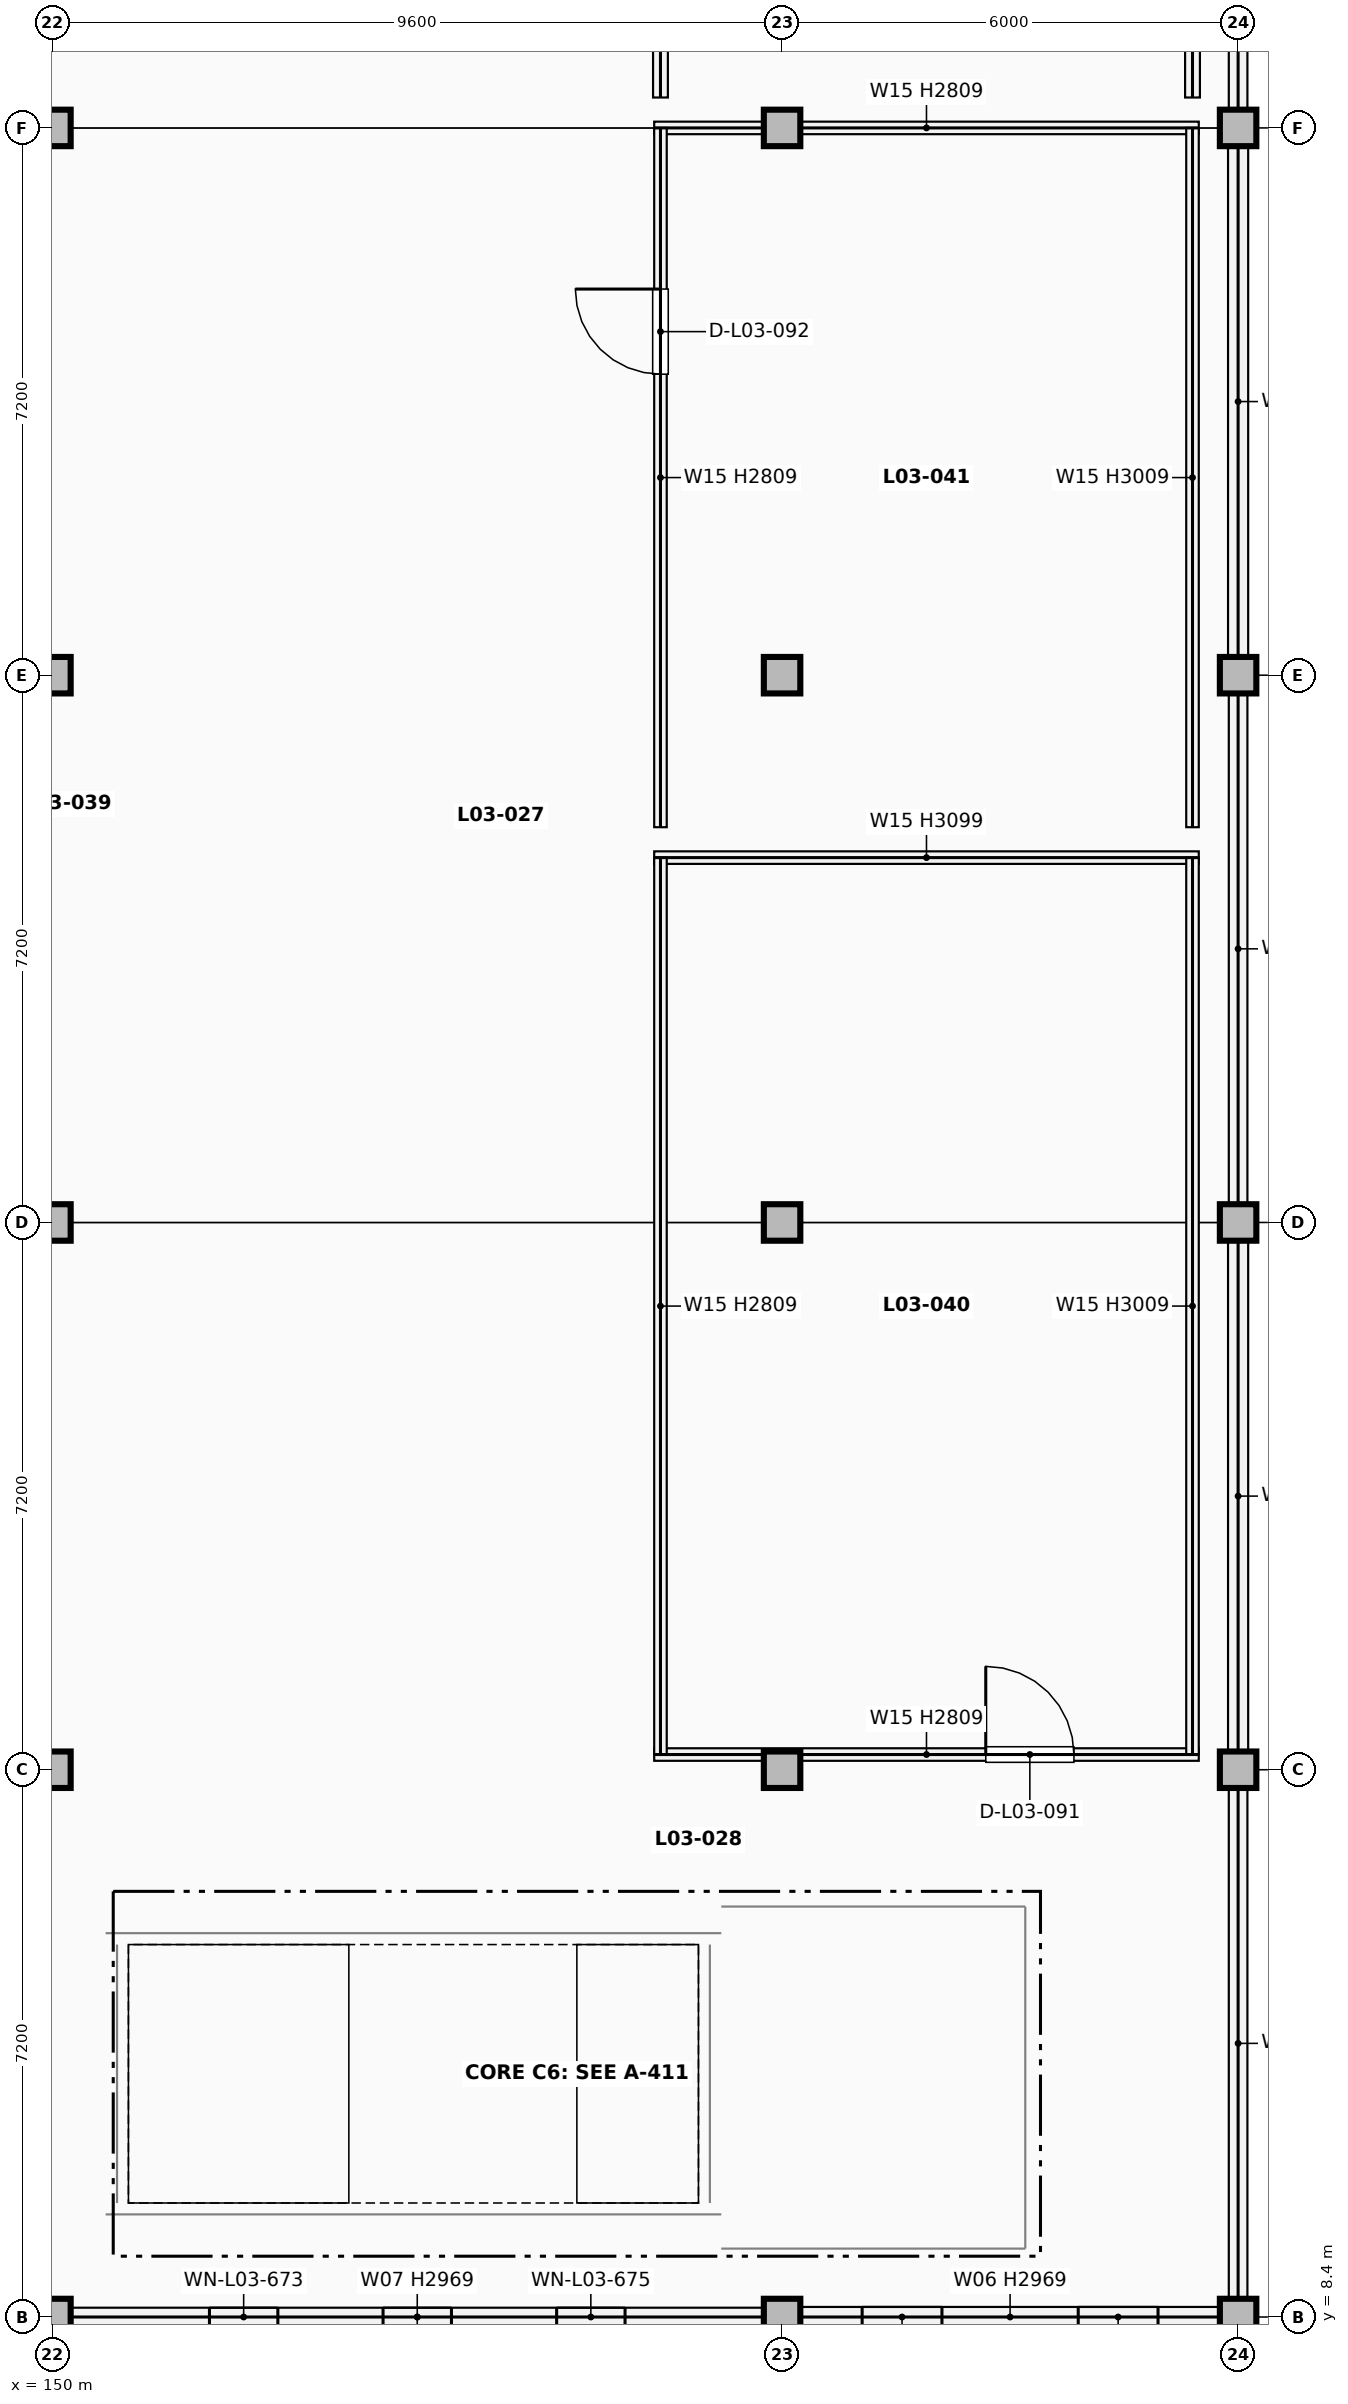
"""IFC4 building model, lengths in metres.
Left out: names, types, materials, properties, quantities, classifications, styles, units other than length and angle.
Written with IfcOpenShell. Run it as: python <this file> out.ifc"""

import sys

from ifc_helpers import new_model, si_unit, direction, frame, frame_2d, origin, origin_2d, place, context, subcontext, project, spatial, rectangle, extrude, element, fill, save


model = new_model("IFC4")
c1 = context("Model", 3, precision=1e-05, world=origin(), true_north=direction((0.0, 1.0)))
c2 = subcontext(c1, "Body", "Model", "MODEL_VIEW")
j1 = project(units=[si_unit("LENGTHUNIT", "METRE"), si_unit("PLANEANGLEUNIT", "RADIAN")], contexts=[c1])
p1 = place(None, origin())
s1 = spatial("IfcSite", under=j1, at=p1, CompositionType="ELEMENT")
p2 = place(p1, origin())
s2 = spatial("IfcBuilding", under=s1, at=p2, CompositionType="ELEMENT")
p3 = place(p2, frame((0.0, 0.0, 13.6)))
s3 = spatial("IfcBuildingStorey", under=s2, at=p3, CompositionType="ELEMENT", Elevation=13.6)
for number, where, z_axis, x_axis in (
    (1, (150.0, 8.4, 0.0), (0.0, 0.0, 1.0), (1.0, 0.0, 0.0)),
    (2, (150.0, 15.6, 0.0), (0.0, 0.0, 1.0), (1.0, 0.0, 0.0)),
    (3, (150.0, 22.8, 0.0), (0.0, 0.0, 1.0), (1.0, 0.0, 0.0)),
    (4, (150.0, 30.0, 0.0), (0.0, 0.0, 1.0), (1.0, 0.0, 0.0)),
    (5, (150.0, 37.2, 0.0), (0.0, 0.0, 1.0), (1.0, 0.0, 0.0)),
    (6, (159.6, 8.4, 0.0), (0.0, 0.0, 1.0), (1.0, 0.0, 0.0)),
    (7, (159.6, 15.6, 0.0), (0.0, 0.0, 1.0), (1.0, 0.0, 0.0)),
    (8, (159.6, 22.8, 0.0), (0.0, 0.0, 1.0), (1.0, 0.0, 0.0)),
    (9, (159.6, 30.0, 0.0), (0.0, 0.0, 1.0), (1.0, 0.0, 0.0)),
    (10, (159.6, 37.2, 0.0), (0.0, 0.0, 1.0), (1.0, 0.0, 0.0)),
    (11, (165.6, 8.4, 0.0), (0.0, 0.0, 1.0), (1.0, 0.0, 0.0)),
    (12, (165.6, 15.6, 0.0), (0.0, 0.0, 1.0), (1.0, 0.0, 0.0)),
    (13, (165.6, 22.8, 0.0), (0.0, 0.0, 1.0), (1.0, 0.0, 0.0)),
    (14, (165.6, 30.0, 0.0), (0.0, 0.0, 1.0), (1.0, 0.0, 0.0)),
    (15, (165.6, 37.2, 0.0), (0.0, 0.0, 1.0), (1.0, 0.0, 0.0)),
):
    element("IfcColumn", number, at=place(p3, frame(where, z_axis=z_axis, x_axis=x_axis)), inside=s3, PredefinedType="COLUMN", context=c2, shape_type="SweptSolid", body=[
        extrude(rectangle(XDim=0.48, YDim=0.48, at=origin_2d()), origin(), (0.0, 0.0, 1.0), 3.74),
    ])
p4 = place(p3, frame((165.6, 8.642, 0.0), z_axis=(0.0, 0.0, 1.0), x_axis=(0.0, 1.0, 0.0)))
e16 = element("IfcWall", 16, at=p4, inside=s3, PredefinedType="SOLIDWALL", context=c2, shape_type="SweptSolid", body=[
    extrude(rectangle(XDim=6.716, YDim=0.245, at=frame_2d((3.358, 0.0))), origin(), (0.0, 0.0, 1.0), 2.969),
])
p5 = place(p3, frame((165.6, 15.842, 0.0), z_axis=(0.0, 0.0, 1.0), x_axis=(0.0, 1.0, 0.0)))
e17 = element("IfcWall", 17, at=p5, inside=s3, PredefinedType="SOLIDWALL", context=c2, shape_type="SweptSolid", body=[
    extrude(rectangle(XDim=6.716, YDim=0.265, at=frame_2d((3.358, 0.0))), origin(), (0.0, 0.0, 1.0), 2.999),
])
p6 = place(p3, frame((165.6, 23.042, 0.0), z_axis=(0.0, 0.0, 1.0), x_axis=(0.0, 1.0, 0.0)))
e18 = element("IfcWall", 18, at=p6, inside=s3, PredefinedType="SOLIDWALL", context=c2, shape_type="SweptSolid", body=[
    extrude(rectangle(XDim=6.716, YDim=0.245, at=frame_2d((3.358, 0.0))), origin(), (0.0, 0.0, 1.0), 2.999),
])
p7 = place(p3, frame((165.6, 30.242, 0.0), z_axis=(0.0, 0.0, 1.0), x_axis=(0.0, 1.0, 0.0)))
e19 = element("IfcWall", 19, at=p7, inside=s3, PredefinedType="SOLIDWALL", context=c2, shape_type="SweptSolid", body=[
    extrude(rectangle(XDim=6.716, YDim=0.265, at=frame_2d((3.358, 0.0))), origin(), (0.0, 0.0, 1.0), 2.999),
])
p8 = place(p3, frame((165.6, 37.442, 0.0), z_axis=(0.0, 0.0, 1.0), x_axis=(0.0, 1.0, 0.0)))
e20 = element("IfcWall", 20, at=p8, inside=s3, PredefinedType="SOLIDWALL", context=c2, shape_type="SweptSolid", body=[
    extrude(rectangle(XDim=6.716, YDim=0.245, at=frame_2d((3.358, 0.0))), origin(), (0.0, 0.0, 1.0), 2.999),
])
p9 = place(p3, frame((150.242, 8.4, 0.0), z_axis=(0.0, 0.0, 1.0), x_axis=(1.0, 0.0, 0.0)))
e21 = element("IfcWall", 21, at=p9, inside=s3, PredefinedType="SOLIDWALL", context=c2, shape_type="SweptSolid", body=[
    extrude(rectangle(XDim=9.116, YDim=0.245, at=frame_2d((4.558, 0.0))), origin(), (0.0, 0.0, 1.0), 2.969),
])
p10 = place(p9, frame((1.824, 0.0, 0.75)))
e22 = element("IfcOpeningElement", 22, at=p10, cuts=e21, PredefinedType="OPENING", context=c2, shape_type="SweptSolid", body=[
    extrude(rectangle(XDim=0.9, YDim=1.95, at=frame_2d((0.45, 0.975))), frame((0.0, 0.133, 0.0), z_axis=(0.0, -1.0, 0.0), x_axis=(1.0, 0.0, 0.0)), (0.0, 0.0, 1.0), 0.265),
])
p11 = place(p9, frame((4.108, 0.0, 0.75)))
e23 = element("IfcOpeningElement", 23, at=p11, cuts=e21, PredefinedType="OPENING", context=c2, shape_type="SweptSolid", body=[
    extrude(rectangle(XDim=0.9, YDim=1.95, at=frame_2d((0.45, 0.975))), frame((0.0, 0.133, 0.0), z_axis=(0.0, -1.0, 0.0), x_axis=(1.0, 0.0, 0.0)), (0.0, 0.0, 1.0), 0.265),
])
p12 = place(p9, frame((6.392, 0.0, 0.75)))
e24 = element("IfcOpeningElement", 24, at=p12, cuts=e21, PredefinedType="OPENING", context=c2, shape_type="SweptSolid", body=[
    extrude(rectangle(XDim=0.9, YDim=1.95, at=frame_2d((0.45, 0.975))), frame((0.0, 0.133, 0.0), z_axis=(0.0, -1.0, 0.0), x_axis=(1.0, 0.0, 0.0)), (0.0, 0.0, 1.0), 0.265),
])
p13 = place(p3, frame((159.842, 8.4, 0.0), z_axis=(0.0, 0.0, 1.0), x_axis=(1.0, 0.0, 0.0)))
e25 = element("IfcWall", 25, at=p13, inside=s3, PredefinedType="SOLIDWALL", context=c2, shape_type="SweptSolid", body=[
    extrude(rectangle(XDim=5.516, YDim=0.265, at=frame_2d((2.758, 0.0))), origin(), (0.0, 0.0, 1.0), 2.969),
])
p14 = place(p13, frame((0.812, 0.0, 0.75)))
e26 = element("IfcOpeningElement", 26, at=p14, cuts=e25, PredefinedType="OPENING", context=c2, shape_type="SweptSolid", body=[
    extrude(rectangle(XDim=1.05, YDim=2.1, at=frame_2d((0.525, 1.05))), frame((0.0, 0.143, 0.0), z_axis=(0.0, -1.0, 0.0), x_axis=(1.0, 0.0, 0.0)), (0.0, 0.0, 1.0), 0.285),
])
p15 = place(p13, frame((3.655, 0.0, 0.75)))
e27 = element("IfcOpeningElement", 27, at=p15, cuts=e25, PredefinedType="OPENING", context=c2, shape_type="SweptSolid", body=[
    extrude(rectangle(XDim=1.05, YDim=2.1, at=frame_2d((0.525, 1.05))), frame((0.0, 0.143, 0.0), z_axis=(0.0, -1.0, 0.0), x_axis=(1.0, 0.0, 0.0)), (0.0, 0.0, 1.0), 0.285),
])
p16 = place(p3, frame((150.85, 9.9, 0.0), z_axis=(0.0, 0.0, 1.0), x_axis=(0.0, 1.0, 0.0)))
e28 = element("IfcWall", 28, at=p16, inside=s3, PredefinedType="SHEAR", context=c2, shape_type="SweptSolid", body=[
    extrude(rectangle(XDim=3.4, YDim=0.3, at=frame_2d((1.7, 0.0))), origin(), (0.0, 0.0, 1.0), 3.74),
])
for number, where, z_axis, x_axis in (
    (29, (150.7, 9.75, 0.0), (0.0, 0.0, 1.0), (1.0, 0.0, 0.0)),
    (30, (150.7, 13.45, 0.0), (0.0, 0.0, 1.0), (1.0, 0.0, 0.0)),
):
    element("IfcWall", number, at=place(p3, frame(where, z_axis=z_axis, x_axis=x_axis)), inside=s3, PredefinedType="SHEAR", context=c2, shape_type="SweptSolid", body=[
        extrude(rectangle(XDim=8.1, YDim=0.3, at=frame_2d((4.05, 0.0))), origin(), (0.0, 0.0, 1.0), 3.74),
    ])
p17 = place(p3, frame((158.65, 9.9, 0.0), z_axis=(0.0, 0.0, 1.0), x_axis=(0.0, 1.0, 0.0)))
e31 = element("IfcWall", 31, at=p17, inside=s3, PredefinedType="SHEAR", context=c2, shape_type="SweptSolid", body=[
    extrude(rectangle(XDim=3.4, YDim=0.3, at=frame_2d((1.7, 0.0))), origin(), (0.0, 0.0, 1.0), 3.74),
])
p18 = place(p17, frame((1.1, 0.0, 0.0)))
e32 = element("IfcOpeningElement", 32, at=p18, cuts=e31, PredefinedType="OPENING", context=c2, shape_type="SweptSolid", body=[
    extrude(rectangle(XDim=1.2, YDim=2.2, at=frame_2d((0.6, 1.1))), frame((0.0, 0.16, 0.0), z_axis=(0.0, -1.0, 0.0), x_axis=(1.0, 0.0, 0.0)), (0.0, 0.0, 1.0), 0.32),
])
p19 = place(p3, frame((162.8, 9.3, 0.0), z_axis=(0.0, 0.0, 1.0), x_axis=(0.0, 1.0, 0.0)))
e33 = element("IfcWall", 33, at=p19, inside=s3, PredefinedType="PARTITIONING", context=c2, shape_type="SweptSolid", body=[
    extrude(rectangle(XDim=4.5, YDim=0.2, at=frame_2d((2.25, 0.0))), origin(), (0.0, 0.0, 1.0), 3.099),
])
p20 = place(p3, frame((158.8, 9.3, 0.0), z_axis=(0.0, 0.0, 1.0), x_axis=(1.0, 0.0, 0.0)))
e34 = element("IfcWall", 34, at=p20, inside=s3, PredefinedType="PARTITIONING", context=c2, shape_type="SweptSolid", body=[
    extrude(rectangle(XDim=4.0, YDim=0.2, at=frame_2d((2.0, 0.0))), origin(), (0.0, 0.0, 1.0), 3.099),
])
p21 = place(p3, frame((158.8, 13.8, 0.0), z_axis=(0.0, 0.0, 1.0), x_axis=(1.0, 0.0, 0.0)))
e35 = element("IfcWall", 35, at=p21, inside=s3, PredefinedType="PARTITIONING", context=c2, shape_type="SweptSolid", body=[
    extrude(rectangle(XDim=4.0, YDim=0.2, at=frame_2d((2.0, 0.0))), origin(), (0.0, 0.0, 1.0), 3.099),
])
p22 = place(p21, frame((1.275, 0.0, 0.0)))
e36 = element("IfcOpeningElement", 36, at=p22, cuts=e35, PredefinedType="OPENING", context=c2, shape_type="SweptSolid", body=[
    extrude(rectangle(XDim=1.45, YDim=2.2, at=frame_2d((0.725, 1.1))), frame((0.0, 0.11, 0.0), z_axis=(0.0, -1.0, 0.0), x_axis=(1.0, 0.0, 0.0)), (0.0, 0.0, 1.0), 0.22),
])
p23 = place(p3, frame((157.917, 15.8, 0.0), z_axis=(0.0, 0.0, 1.0), x_axis=(1.0, 0.0, 0.0)))
e37 = element("IfcWall", 37, at=p23, inside=s3, PredefinedType="PARTITIONING", context=c2, shape_type="SweptSolid", body=[
    extrude(rectangle(XDim=7.165, YDim=0.165, at=frame_2d((3.583, 0.0))), origin(), (0.0, 0.0, 1.0), 2.809),
])
p24 = place(p23, frame((4.363, 0.0, 0.0)))
e38 = element("IfcOpeningElement", 38, at=p24, cuts=e37, PredefinedType="OPENING", context=c2, shape_type="SweptSolid", body=[
    extrude(rectangle(XDim=1.16, YDim=2.22, at=frame_2d((0.58, 1.11))), frame((0.0, 0.093, 0.0), z_axis=(0.0, -1.0, 0.0), x_axis=(1.0, 0.0, 0.0)), (0.0, 0.0, 1.0), 0.185),
])
p25 = place(p3, frame((157.917, 27.6, 0.0), z_axis=(0.0, 0.0, 1.0), x_axis=(1.0, 0.0, 0.0)))
e39 = element("IfcWall", 39, at=p25, inside=s3, PredefinedType="PARTITIONING", context=c2, shape_type="SweptSolid", body=[
    extrude(rectangle(XDim=7.165, YDim=0.165, at=frame_2d((3.583, 0.0))), origin(), (0.0, 0.0, 1.0), 3.099),
])
p26 = place(p3, frame((158.0, 15.8, 0.0), z_axis=(0.0, 0.0, 1.0), x_axis=(0.0, 1.0, 0.0)))
e40 = element("IfcWall", 40, at=p26, inside=s3, PredefinedType="PARTITIONING", context=c2, shape_type="SweptSolid", body=[
    extrude(rectangle(XDim=11.8, YDim=0.165, at=frame_2d((5.9, 0.0))), origin(), (0.0, 0.0, 1.0), 2.809),
])
p27 = place(p3, frame((165.0, 15.8, 0.0), z_axis=(0.0, 0.0, 1.0), x_axis=(0.0, 1.0, 0.0)))
e41 = element("IfcWall", 41, at=p27, inside=s3, PredefinedType="PARTITIONING", context=c2, shape_type="SweptSolid", body=[
    extrude(rectangle(XDim=11.8, YDim=0.165, at=frame_2d((5.9, 0.0))), origin(), (0.0, 0.0, 1.0), 3.009),
])
p28 = place(p3, frame((157.917, 37.2, 0.0), z_axis=(0.0, 0.0, 1.0), x_axis=(1.0, 0.0, 0.0)))
e42 = element("IfcWall", 42, at=p28, inside=s3, PredefinedType="PARTITIONING", context=c2, shape_type="SweptSolid", body=[
    extrude(rectangle(XDim=7.165, YDim=0.165, at=frame_2d((3.583, 0.0))), origin(), (0.0, 0.0, 1.0), 2.809),
])
p29 = place(p3, frame((158.0, 28.0, 0.0), z_axis=(0.0, 0.0, 1.0), x_axis=(0.0, 1.0, 0.0)))
e43 = element("IfcWall", 43, at=p29, inside=s3, PredefinedType="PARTITIONING", context=c2, shape_type="SweptSolid", body=[
    extrude(rectangle(XDim=9.2, YDim=0.165, at=frame_2d((4.6, 0.0))), origin(), (0.0, 0.0, 1.0), 2.809),
])
p30 = place(p29, frame((5.96, 0.0, 0.0)))
e44 = element("IfcOpeningElement", 44, at=p30, cuts=e43, PredefinedType="OPENING", context=c2, shape_type="SweptSolid", body=[
    extrude(rectangle(XDim=1.12, YDim=2.22, at=frame_2d((0.56, 1.11))), frame((0.0, 0.093, 0.0), z_axis=(0.0, -1.0, 0.0), x_axis=(1.0, 0.0, 0.0)), (0.0, 0.0, 1.0), 0.185),
])
p31 = place(p3, frame((165.0, 28.0, 0.0), z_axis=(0.0, 0.0, 1.0), x_axis=(0.0, 1.0, 0.0)))
e45 = element("IfcWall", 45, at=p31, inside=s3, PredefinedType="PARTITIONING", context=c2, shape_type="SweptSolid", body=[
    extrude(rectangle(XDim=9.2, YDim=0.165, at=frame_2d((4.6, 0.0))), origin(), (0.0, 0.0, 1.0), 3.009),
])
p32 = place(p3, frame((158.0, 37.6, 0.0), z_axis=(0.0, 0.0, 1.0), x_axis=(0.0, 1.0, 0.0)))
e46 = element("IfcWall", 46, at=p32, inside=s3, PredefinedType="PARTITIONING", context=c2, shape_type="SweptSolid", body=[
    extrude(rectangle(XDim=6.4, YDim=0.195, at=frame_2d((3.2, 0.0))), origin(), (0.0, 0.0, 1.0), 3.414),
])
p33 = place(p32, frame((2.675, 0.0, 0.0)))
e47 = element("IfcOpeningElement", 47, at=p33, cuts=e46, PredefinedType="OPENING", context=c2, shape_type="SweptSolid", body=[
    extrude(rectangle(XDim=1.05, YDim=2.15, at=frame_2d((0.525, 1.075))), frame((0.0, 0.107, 0.0), z_axis=(0.0, -1.0, 0.0), x_axis=(1.0, 0.0, 0.0)), (0.0, 0.0, 1.0), 0.215),
])
p34 = place(p3, frame((165.0, 37.6, 0.0), z_axis=(0.0, 0.0, 1.0), x_axis=(0.0, 1.0, 0.0)))
e48 = element("IfcWall", 48, at=p34, inside=s3, PredefinedType="PARTITIONING", context=c2, shape_type="SweptSolid", body=[
    extrude(rectangle(XDim=6.4, YDim=0.195, at=frame_2d((3.2, 0.0))), origin(), (0.0, 0.0, 1.0), 3.414),
])
p35 = place(p10, origin())
e49 = element("IfcWindow", 49, at=p35, inside=s3, PartitioningType="SINGLE_PANEL", PredefinedType="WINDOW", context=c2, shape_type="SweptSolid", body=[
    extrude(rectangle(XDim=0.9, YDim=1.95, at=frame_2d((0.45, 0.975))), frame((0.0, 0.03, 0.0), z_axis=(0.0, -1.0, 0.0), x_axis=(1.0, 0.0, 0.0)), (0.0, 0.0, 1.0), 0.06),
])
fill(e22, e49)
p36 = place(p11, origin())
e50 = element("IfcWindow", 50, at=p36, inside=s3, PartitioningType="SINGLE_PANEL", PredefinedType="WINDOW", context=c2, shape_type="SweptSolid", body=[
    extrude(rectangle(XDim=0.9, YDim=1.95, at=frame_2d((0.45, 0.975))), frame((0.0, 0.03, 0.0), z_axis=(0.0, -1.0, 0.0), x_axis=(1.0, 0.0, 0.0)), (0.0, 0.0, 1.0), 0.06),
])
fill(e23, e50)
p37 = place(p12, origin())
e51 = element("IfcWindow", 51, at=p37, inside=s3, PartitioningType="SINGLE_PANEL", PredefinedType="WINDOW", context=c2, shape_type="SweptSolid", body=[
    extrude(rectangle(XDim=0.9, YDim=1.95, at=frame_2d((0.45, 0.975))), frame((0.0, 0.03, 0.0), z_axis=(0.0, -1.0, 0.0), x_axis=(1.0, 0.0, 0.0)), (0.0, 0.0, 1.0), 0.06),
])
fill(e24, e51)
p38 = place(p14, origin())
e52 = element("IfcWindow", 52, at=p38, inside=s3, PartitioningType="SINGLE_PANEL", PredefinedType="WINDOW", context=c2, shape_type="SweptSolid", body=[
    extrude(rectangle(XDim=1.05, YDim=2.1, at=frame_2d((0.525, 1.05))), frame((0.0, 0.03, 0.0), z_axis=(0.0, -1.0, 0.0), x_axis=(1.0, 0.0, 0.0)), (0.0, 0.0, 1.0), 0.06),
])
fill(e26, e52)
p39 = place(p15, origin())
e53 = element("IfcWindow", 53, at=p39, inside=s3, PartitioningType="SINGLE_PANEL", PredefinedType="WINDOW", context=c2, shape_type="SweptSolid", body=[
    extrude(rectangle(XDim=1.05, YDim=2.1, at=frame_2d((0.525, 1.05))), frame((0.0, 0.03, 0.0), z_axis=(0.0, -1.0, 0.0), x_axis=(1.0, 0.0, 0.0)), (0.0, 0.0, 1.0), 0.06),
])
fill(e27, e53)
p40 = place(p18, origin())
e54 = element("IfcDoor", 54, at=p40, inside=s3, OperationType="SINGLE_SWING_RIGHT", PredefinedType="DOOR", context=c2, shape_type="SweptSolid", body=[
    extrude(rectangle(XDim=1.2, YDim=2.2, at=frame_2d((0.6, 1.1))), frame((0.0, 0.025, 0.0), z_axis=(0.0, -1.0, 0.0), x_axis=(1.0, 0.0, 0.0)), (0.0, 0.0, 1.0), 0.05),
])
fill(e32, e54)
p41 = place(p22, origin())
e55 = element("IfcDoor", 55, at=p41, inside=s3, OperationType="DOUBLE_DOOR_SINGLE_SWING", PredefinedType="DOOR", context=c2, shape_type="SweptSolid", body=[
    extrude(rectangle(XDim=1.45, YDim=2.2, at=frame_2d((0.725, 1.1))), frame((0.0, 0.025, 0.0), z_axis=(0.0, -1.0, 0.0), x_axis=(1.0, 0.0, 0.0)), (0.0, 0.0, 1.0), 0.05),
])
fill(e36, e55)
p42 = place(p24, origin())
e56 = element("IfcDoor", 56, at=p42, inside=s3, OperationType="SINGLE_SWING_LEFT", PredefinedType="DOOR", context=c2, shape_type="SweptSolid", body=[
    extrude(rectangle(XDim=1.16, YDim=2.22, at=frame_2d((0.58, 1.11))), frame((0.0, 0.025, 0.0), z_axis=(0.0, -1.0, 0.0), x_axis=(1.0, 0.0, 0.0)), (0.0, 0.0, 1.0), 0.05),
])
fill(e38, e56)
p43 = place(p30, origin())
e57 = element("IfcDoor", 57, at=p43, inside=s3, OperationType="SINGLE_SWING_RIGHT", PredefinedType="DOOR", context=c2, shape_type="SweptSolid", body=[
    extrude(rectangle(XDim=1.12, YDim=2.22, at=frame_2d((0.56, 1.11))), frame((0.0, 0.025, 0.0), z_axis=(0.0, -1.0, 0.0), x_axis=(1.0, 0.0, 0.0)), (0.0, 0.0, 1.0), 0.05),
])
fill(e44, e57)
save(model, sys.argv[1])
